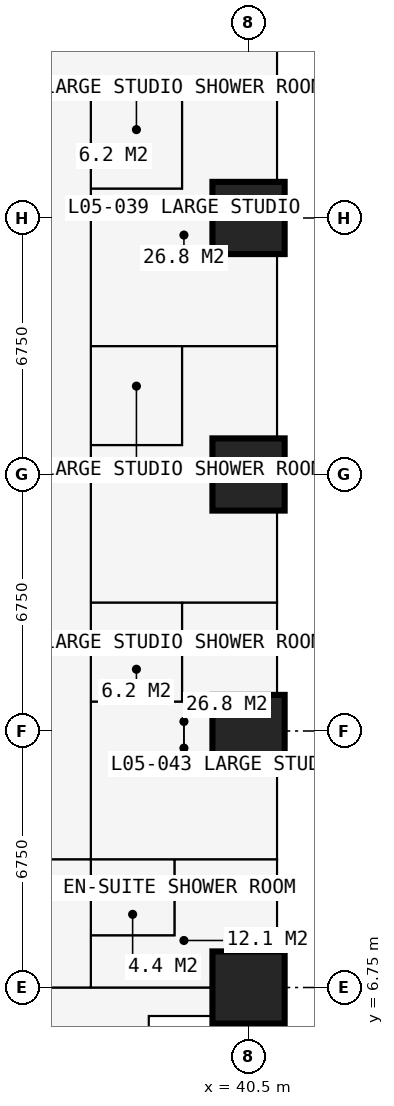
"""IFC4 building model, lengths in metres.
Left out: names, types, materials, properties, quantities, classifications, styles, units other than length and angle.
Written with IfcOpenShell. Run it as: python <this file> out.ifc"""

import sys

from ifc_helpers import new_model, si_unit, direction, frame, frame_2d, origin, origin_2d, place, context, subcontext, project, spatial, rectangle, extrude, element, fill, save


model = new_model("IFC4")
c1 = context("Model", 3, precision=1e-05, world=origin(), true_north=direction((0.0, 1.0)))
c2 = subcontext(c1, "Body", "Model", "MODEL_VIEW")
j1 = project(units=[si_unit("LENGTHUNIT", "METRE"), si_unit("PLANEANGLEUNIT", "RADIAN")], contexts=[c1])
p1 = place(None, origin())
s1 = spatial("IfcSite", under=j1, at=p1, CompositionType="ELEMENT")
p2 = place(p1, origin())
s2 = spatial("IfcBuilding", under=s1, at=p2, CompositionType="ELEMENT")
p3 = place(p2, frame((0.0, 0.0, 21.6)))
s3 = spatial("IfcBuildingStorey", under=s2, at=p3, CompositionType="ELEMENT", Elevation=21.6)
for number, where, z_axis, x_axis in (
    (1, (40.5, 6.75, 0.0), (0.0, 0.0, 1.0), (1.0, 0.0, 0.0)),
    (2, (40.5, 13.5, 0.0), (0.0, 0.0, 1.0), (1.0, 0.0, 0.0)),
    (3, (40.5, 20.25, 0.0), (0.0, 0.0, 1.0), (1.0, 0.0, 0.0)),
    (4, (40.5, 27.0, 0.0), (0.0, 0.0, 1.0), (1.0, 0.0, 0.0)),
):
    element("IfcColumn", number, at=place(p3, frame(where, z_axis=z_axis, x_axis=x_axis)), inside=s3, PredefinedType="COLUMN", context=c2, shape_type="SweptSolid", body=[
        extrude(rectangle(XDim=1.9, YDim=1.9, at=origin_2d()), origin(), (0.0, 0.0, 1.0), 3.6),
    ])
p4 = place(p3, frame((41.25, 27.0, 0.0), z_axis=(0.0, 0.0, 1.0), x_axis=(0.0, -1.0, 0.0)))
e5 = element("IfcWall", 5, at=p4, inside=s3, PredefinedType="SOLIDWALL", context=c2, shape_type="SweptSolid", body=[
    extrude(rectangle(XDim=6.75, YDim=0.15, at=frame_2d((3.375, 0.0))), origin(), (0.0, 0.0, 1.0), 3.375),
])
p5 = place(p4, frame((0.996, 0.0, 0.0)))
e6 = element("IfcOpeningElement", 6, at=p5, cuts=e5, PredefinedType="OPENING", context=c2, shape_type="SweptSolid", body=[
    extrude(rectangle(XDim=1.0, YDim=2.2, at=frame_2d((0.5, 1.1))), frame((0.0, 0.085, 0.0), z_axis=(0.0, -1.0, 0.0), x_axis=(1.0, 0.0, 0.0)), (0.0, 0.0, 1.0), 0.17),
])
p6 = place(p4, frame((2.042, 0.0, 0.9)))
e7 = element("IfcOpeningElement", 7, at=p6, cuts=e5, PredefinedType="OPENING", context=c2, shape_type="SweptSolid", body=[
    extrude(rectangle(XDim=1.2, YDim=1.8, at=frame_2d((0.6, 0.9))), frame((0.0, 0.085, 0.0), z_axis=(0.0, -1.0, 0.0), x_axis=(1.0, 0.0, 0.0)), (0.0, 0.0, 1.0), 0.17),
])
p7 = place(p4, frame((4.754, 0.0, 0.0)))
e8 = element("IfcOpeningElement", 8, at=p7, cuts=e5, PredefinedType="OPENING", context=c2, shape_type="SweptSolid", body=[
    extrude(rectangle(XDim=1.0, YDim=2.2, at=frame_2d((0.5, 1.1))), frame((0.0, 0.085, 0.0), z_axis=(0.0, -1.0, 0.0), x_axis=(1.0, 0.0, 0.0)), (0.0, 0.0, 1.0), 0.17),
])
p8 = place(p4, frame((3.508, 0.0, 0.9)))
e9 = element("IfcOpeningElement", 9, at=p8, cuts=e5, PredefinedType="OPENING", context=c2, shape_type="SweptSolid", body=[
    extrude(rectangle(XDim=1.2, YDim=1.8, at=frame_2d((0.6, 0.9))), frame((0.0, 0.085, 0.0), z_axis=(0.0, -1.0, 0.0), x_axis=(1.0, 0.0, 0.0)), (0.0, 0.0, 1.0), 0.17),
])
p9 = place(p3, frame((37.875, 2.625, 0.0), z_axis=(0.0, 0.0, 1.0), x_axis=(0.0, 1.0, 0.0)))
e10 = element("IfcWall", 10, at=p9, inside=s3, PredefinedType="SOLIDWALL", context=c2, shape_type="SweptSolid", body=[
    extrude(rectangle(XDim=3.375, YDim=0.3, at=frame_2d((1.688, 0.0))), origin(), (0.0, 0.0, 1.0), 3.375),
])
p10 = place(p9, frame((0.788, 0.0, 0.6)))
e11 = element("IfcOpeningElement", 11, at=p10, cuts=e10, PredefinedType="OPENING", context=c2, shape_type="SweptSolid", body=[
    extrude(rectangle(XDim=1.8, YDim=2.1, at=frame_2d((0.9, 1.05))), frame((0.0, 0.16, 0.0), z_axis=(0.0, -1.0, 0.0), x_axis=(1.0, 0.0, 0.0)), (0.0, 0.0, 1.0), 0.32),
])
p11 = place(p3, frame((37.875, 6.0, 0.0), z_axis=(0.0, 0.0, 1.0), x_axis=(1.0, 0.0, 0.0)))
e12 = element("IfcWall", 12, at=p11, inside=s3, PredefinedType="SOLIDWALL", context=c2, shape_type="SweptSolid", body=[
    extrude(rectangle(XDim=3.375, YDim=0.3, at=frame_2d((1.688, 0.0))), origin(), (0.0, 0.0, 1.0), 3.375),
])
p12 = place(p11, frame((0.317, 0.0, 0.9)))
e13 = element("IfcOpeningElement", 13, at=p12, cuts=e12, PredefinedType="OPENING", context=c2, shape_type="SweptSolid", body=[
    extrude(rectangle(XDim=1.2, YDim=1.8, at=frame_2d((0.6, 0.9))), frame((0.0, 0.16, 0.0), z_axis=(0.0, -1.0, 0.0), x_axis=(1.0, 0.0, 0.0)), (0.0, 0.0, 1.0), 0.32),
])
p13 = place(p3, frame((41.35, 23.625, 0.0), z_axis=(0.0, 0.0, 1.0), x_axis=(1.0, 0.0, 0.0)))
e14 = element("IfcWall", 14, at=p13, inside=s3, PredefinedType="USERDEFINED", context=c2, shape_type="SweptSolid", body=[
    extrude(rectangle(XDim=2.2, YDim=1.0, at=frame_2d((1.1, 0.0))), origin(), (0.0, 0.0, 1.0), 0.9),
])
p14 = place(p3, frame((30.375, 6.75, 0.0), z_axis=(0.0, 0.0, 1.0), x_axis=(1.0, 0.0, 0.0)))
e15 = element("IfcWall", 15, at=p14, inside=s3, PredefinedType="PARTITIONING", context=c2, shape_type="SweptSolid", body=[
    extrude(rectangle(XDim=10.859, YDim=0.15, at=frame_2d((5.429, 0.0))), origin(), (0.0, 0.0, 1.0), 2.877),
])
p15 = place(p14, frame((1.4, 0.0, 0.0)))
e16 = element("IfcOpeningElement", 16, at=p15, cuts=e15, PredefinedType="OPENING", context=c2, shape_type="SweptSolid", body=[
    extrude(rectangle(XDim=1.0, YDim=2.2, at=frame_2d((0.5, 1.1))), frame((0.0, 0.085, 0.0), z_axis=(0.0, -1.0, 0.0), x_axis=(1.0, 0.0, 0.0)), (0.0, 0.0, 1.0), 0.17),
])
p16 = place(p3, frame((30.375, 10.125, 0.0), z_axis=(0.0, 0.0, 1.0), x_axis=(1.0, 0.0, 0.0)))
e17 = element("IfcWall", 17, at=p16, inside=s3, PredefinedType="PARTITIONING", context=c2, shape_type="SweptSolid", body=[
    extrude(rectangle(XDim=10.859, YDim=0.15, at=frame_2d((5.429, 0.0))), origin(), (0.0, 0.0, 1.0), 3.375),
])
p17 = place(p16, frame((2.5, 0.0, 0.0)))
e18 = element("IfcOpeningElement", 18, at=p17, cuts=e17, PredefinedType="OPENING", context=c2, shape_type="SweptSolid", body=[
    extrude(rectangle(XDim=1.0, YDim=2.2, at=frame_2d((0.5, 1.1))), frame((0.0, 0.085, 0.0), z_axis=(0.0, -1.0, 0.0), x_axis=(1.0, 0.0, 0.0)), (0.0, 0.0, 1.0), 0.17),
])
p18 = place(p3, frame((30.375, 30.375, 0.0), z_axis=(0.0, 0.0, 1.0), x_axis=(1.0, 0.0, 0.0)))
e19 = element("IfcWall", 19, at=p18, inside=s3, PredefinedType="PARTITIONING", context=c2, shape_type="SweptSolid", body=[
    extrude(rectangle(XDim=10.859, YDim=0.15, at=frame_2d((5.429, 0.0))), origin(), (0.0, 0.0, 1.0), 3.375),
])
p19 = place(p3, frame((36.35, 6.75, 0.0), z_axis=(0.0, 0.0, 1.0), x_axis=(0.0, 1.0, 0.0)))
e20 = element("IfcWall", 20, at=p19, inside=s3, PredefinedType="PARTITIONING", context=c2, shape_type="SweptSolid", body=[
    extrude(rectangle(XDim=23.625, YDim=0.15, at=frame_2d((11.812, 0.0))), origin(), (0.0, 0.0, 1.0), 3.375),
])
p20 = place(p19, frame((0.2, 0.0, 0.0)))
e21 = element("IfcOpeningElement", 21, at=p20, cuts=e20, PredefinedType="OPENING", context=c2, shape_type="SweptSolid", body=[
    extrude(rectangle(XDim=0.95, YDim=2.2, at=frame_2d((0.475, 1.1))), frame((0.0, 0.085, 0.0), z_axis=(0.0, -1.0, 0.0), x_axis=(1.0, 0.0, 0.0)), (0.0, 0.0, 1.0), 0.17),
])
p21 = place(p19, frame((18.475, 0.0, 0.0)))
e22 = element("IfcOpeningElement", 22, at=p21, cuts=e20, PredefinedType="OPENING", context=c2, shape_type="SweptSolid", body=[
    extrude(rectangle(XDim=0.95, YDim=2.2, at=frame_2d((0.475, 1.1))), frame((0.0, 0.085, 0.0), z_axis=(0.0, -1.0, 0.0), x_axis=(1.0, 0.0, 0.0)), (0.0, 0.0, 1.0), 0.17),
])
p22 = place(p19, frame((11.725, 0.0, 0.0)))
e23 = element("IfcOpeningElement", 23, at=p22, cuts=e20, PredefinedType="OPENING", context=c2, shape_type="SweptSolid", body=[
    extrude(rectangle(XDim=0.95, YDim=2.2, at=frame_2d((0.475, 1.1))), frame((0.0, 0.085, 0.0), z_axis=(0.0, -1.0, 0.0), x_axis=(1.0, 0.0, 0.0)), (0.0, 0.0, 1.0), 0.17),
])
p23 = place(p19, frame((4.975, 0.0, 0.0)))
e24 = element("IfcOpeningElement", 24, at=p23, cuts=e20, PredefinedType="OPENING", context=c2, shape_type="SweptSolid", body=[
    extrude(rectangle(XDim=0.95, YDim=2.2, at=frame_2d((0.475, 1.1))), frame((0.0, 0.085, 0.0), z_axis=(0.0, -1.0, 0.0), x_axis=(1.0, 0.0, 0.0)), (0.0, 0.0, 1.0), 0.17),
])
p24 = place(p3, frame((36.35, 8.125, 0.0), z_axis=(0.0, 0.0, 1.0), x_axis=(1.0, 0.0, 0.0)))
e25 = element("IfcWall", 25, at=p24, inside=s3, PredefinedType="PARTITIONING", context=c2, shape_type="SweptSolid", body=[
    extrude(rectangle(XDim=2.2, YDim=0.1, at=frame_2d((1.1, 0.0))), origin(), (0.0, 0.0, 1.0), 3.375),
])
p25 = place(p24, frame((0.65, 0.0, 0.0)))
e26 = element("IfcOpeningElement", 26, at=p25, cuts=e25, PredefinedType="OPENING", context=c2, shape_type="SweptSolid", body=[
    extrude(rectangle(XDim=0.9, YDim=2.2, at=frame_2d((0.45, 1.1))), frame((0.0, 0.06, 0.0), z_axis=(0.0, -1.0, 0.0), x_axis=(1.0, 0.0, 0.0)), (0.0, 0.0, 1.0), 0.12),
])
p26 = place(p3, frame((36.35, 14.275, 0.0), z_axis=(0.0, 0.0, 1.0), x_axis=(1.0, 0.0, 0.0)))
e27 = element("IfcWall", 27, at=p26, inside=s3, PredefinedType="PARTITIONING", context=c2, shape_type="SweptSolid", body=[
    extrude(rectangle(XDim=2.4, YDim=0.1, at=frame_2d((1.2, 0.0))), origin(), (0.0, 0.0, 1.0), 3.375),
])
p27 = place(p3, frame((36.35, 16.875, 0.0), z_axis=(0.0, 0.0, 1.0), x_axis=(1.0, 0.0, 0.0)))
e28 = element("IfcWall", 28, at=p27, inside=s3, PredefinedType="PARTITIONING", context=c2, shape_type="SweptSolid", body=[
    extrude(rectangle(XDim=4.884, YDim=0.175, at=frame_2d((2.442, 0.0))), origin(), (0.0, 0.0, 1.0), 3.375),
])
p28 = place(p27, frame((0.75, 0.0, 0.0)))
e29 = element("IfcOpeningElement", 29, at=p28, cuts=e28, PredefinedType="OPENING", context=c2, shape_type="SweptSolid", body=[
    extrude(rectangle(XDim=0.9, YDim=2.2, at=frame_2d((0.45, 1.1))), frame((0.0, 0.097, 0.0), z_axis=(0.0, -1.0, 0.0), x_axis=(1.0, 0.0, 0.0)), (0.0, 0.0, 1.0), 0.195),
])
p29 = place(p3, frame((36.35, 21.025, 0.0), z_axis=(0.0, 0.0, 1.0), x_axis=(1.0, 0.0, 0.0)))
e30 = element("IfcWall", 30, at=p29, inside=s3, PredefinedType="PARTITIONING", context=c2, shape_type="SweptSolid", body=[
    extrude(rectangle(XDim=2.4, YDim=0.1, at=frame_2d((1.2, 0.0))), origin(), (0.0, 0.0, 1.0), 3.375),
])
p30 = place(p3, frame((36.35, 23.625, 0.0), z_axis=(0.0, 0.0, 1.0), x_axis=(1.0, 0.0, 0.0)))
e31 = element("IfcWall", 31, at=p30, inside=s3, PredefinedType="PARTITIONING", context=c2, shape_type="SweptSolid", body=[
    extrude(rectangle(XDim=4.884, YDim=0.175, at=frame_2d((2.442, 0.0))), origin(), (0.0, 0.0, 1.0), 3.375),
])
p31 = place(p30, frame((0.75, 0.0, 0.0)))
e32 = element("IfcOpeningElement", 32, at=p31, cuts=e31, PredefinedType="OPENING", context=c2, shape_type="SweptSolid", body=[
    extrude(rectangle(XDim=0.9, YDim=2.2, at=frame_2d((0.45, 1.1))), frame((0.0, 0.097, 0.0), z_axis=(0.0, -1.0, 0.0), x_axis=(1.0, 0.0, 0.0)), (0.0, 0.0, 1.0), 0.195),
])
p32 = place(p3, frame((36.35, 27.775, 0.0), z_axis=(0.0, 0.0, 1.0), x_axis=(1.0, 0.0, 0.0)))
e33 = element("IfcWall", 33, at=p32, inside=s3, PredefinedType="PARTITIONING", context=c2, shape_type="SweptSolid", body=[
    extrude(rectangle(XDim=2.4, YDim=0.1, at=frame_2d((1.2, 0.0))), origin(), (0.0, 0.0, 1.0), 3.375),
])
p33 = place(p3, frame((38.55, 8.125, 0.0), z_axis=(0.0, 0.0, 1.0), x_axis=(0.0, 1.0, 0.0)))
e34 = element("IfcWall", 34, at=p33, inside=s3, PredefinedType="PARTITIONING", context=c2, shape_type="SweptSolid", body=[
    extrude(rectangle(XDim=2.0, YDim=0.1, at=frame_2d((1.0, 0.0))), origin(), (0.0, 0.0, 1.0), 3.375),
])
for number, where, z_axis, x_axis in (
    (35, (38.75, 14.275, 0.0), (0.0, 0.0, 1.0), (0.0, 1.0, 0.0)),
    (36, (38.75, 21.025, 0.0), (0.0, 0.0, 1.0), (0.0, 1.0, 0.0)),
):
    element("IfcWall", number, at=place(p3, frame(where, z_axis=z_axis, x_axis=x_axis)), inside=s3, PredefinedType="PARTITIONING", context=c2, shape_type="SweptSolid", body=[
        extrude(rectangle(XDim=2.6, YDim=0.1, at=frame_2d((1.3, 0.0))), origin(), (0.0, 0.0, 1.0), 3.375),
    ])
p34 = place(p3, frame((38.75, 27.775, 0.0), z_axis=(0.0, 0.0, 1.0), x_axis=(0.0, 1.0, 0.0)))
e37 = element("IfcWall", 37, at=p34, inside=s3, PredefinedType="PARTITIONING", context=c2, shape_type="SweptSolid", body=[
    extrude(rectangle(XDim=2.6, YDim=0.1, at=frame_2d((1.3, 0.0))), origin(), (0.0, 0.0, 1.0), 3.375),
])
p35 = place(p34, frame((0.85, 0.0, 0.0)))
e38 = element("IfcOpeningElement", 38, at=p35, cuts=e37, PredefinedType="OPENING", context=c2, shape_type="SweptSolid", body=[
    extrude(rectangle(XDim=0.9, YDim=2.2, at=frame_2d((0.45, 1.1))), frame((0.0, 0.06, 0.0), z_axis=(0.0, -1.0, 0.0), x_axis=(1.0, 0.0, 0.0)), (0.0, 0.0, 1.0), 0.12),
])
p36 = place(p5, origin())
e39 = element("IfcDoor", 39, at=p36, inside=s3, OperationType="SINGLE_SWING_LEFT", PredefinedType="DOOR", context=c2, shape_type="SweptSolid", body=[
    extrude(rectangle(XDim=1.0, YDim=2.2, at=frame_2d((0.5, 1.1))), frame((0.0, 0.025, 0.0), z_axis=(0.0, -1.0, 0.0), x_axis=(1.0, 0.0, 0.0)), (0.0, 0.0, 1.0), 0.05),
])
fill(e6, e39)
p37 = place(p6, origin())
e40 = element("IfcWindow", 40, at=p37, inside=s3, PartitioningType="SINGLE_PANEL", PredefinedType="WINDOW", context=c2, shape_type="SweptSolid", body=[
    extrude(rectangle(XDim=1.2, YDim=1.8, at=frame_2d((0.6, 0.9))), frame((0.0, 0.03, 0.0), z_axis=(0.0, -1.0, 0.0), x_axis=(1.0, 0.0, 0.0)), (0.0, 0.0, 1.0), 0.06),
])
fill(e7, e40)
p38 = place(p7, origin())
e41 = element("IfcDoor", 41, at=p38, inside=s3, OperationType="SINGLE_SWING_RIGHT", PredefinedType="DOOR", context=c2, shape_type="SweptSolid", body=[
    extrude(rectangle(XDim=1.0, YDim=2.2, at=frame_2d((0.5, 1.1))), frame((0.0, 0.025, 0.0), z_axis=(0.0, -1.0, 0.0), x_axis=(1.0, 0.0, 0.0)), (0.0, 0.0, 1.0), 0.05),
])
fill(e8, e41)
p39 = place(p8, origin())
e42 = element("IfcWindow", 42, at=p39, inside=s3, PartitioningType="SINGLE_PANEL", PredefinedType="WINDOW", context=c2, shape_type="SweptSolid", body=[
    extrude(rectangle(XDim=1.2, YDim=1.8, at=frame_2d((0.6, 0.9))), frame((0.0, 0.03, 0.0), z_axis=(0.0, -1.0, 0.0), x_axis=(1.0, 0.0, 0.0)), (0.0, 0.0, 1.0), 0.06),
])
fill(e9, e42)
p40 = place(p12, origin())
e43 = element("IfcWindow", 43, at=p40, inside=s3, PartitioningType="SINGLE_PANEL", PredefinedType="WINDOW", context=c2, shape_type="SweptSolid", body=[
    extrude(rectangle(XDim=1.2, YDim=1.8, at=frame_2d((0.6, 0.9))), frame((0.0, 0.03, 0.0), z_axis=(0.0, -1.0, 0.0), x_axis=(1.0, 0.0, 0.0)), (0.0, 0.0, 1.0), 0.06),
])
fill(e13, e43)
p41 = place(p20, origin())
e44 = element("IfcDoor", 44, at=p41, inside=s3, OperationType="SINGLE_SWING_LEFT", PredefinedType="DOOR", context=c2, shape_type="SweptSolid", body=[
    extrude(rectangle(XDim=0.95, YDim=2.2, at=frame_2d((0.475, 1.1))), frame((0.0, 0.025, 0.0), z_axis=(0.0, -1.0, 0.0), x_axis=(1.0, 0.0, 0.0)), (0.0, 0.0, 1.0), 0.05),
])
fill(e21, e44)
p42 = place(p25, origin())
e45 = element("IfcDoor", 45, at=p42, inside=s3, OperationType="SINGLE_SWING_RIGHT", PredefinedType="DOOR", context=c2, shape_type="SweptSolid", body=[
    extrude(rectangle(XDim=0.9, YDim=2.2, at=frame_2d((0.45, 1.1))), frame((0.0, 0.025, 0.0), z_axis=(0.0, -1.0, 0.0), x_axis=(1.0, 0.0, 0.0)), (0.0, 0.0, 1.0), 0.05),
])
fill(e26, e45)
p43 = place(p21, origin())
e46 = element("IfcDoor", 46, at=p43, inside=s3, OperationType="SINGLE_SWING_LEFT", PredefinedType="DOOR", context=c2, shape_type="SweptSolid", body=[
    extrude(rectangle(XDim=0.95, YDim=2.2, at=frame_2d((0.475, 1.1))), frame((0.0, 0.025, 0.0), z_axis=(0.0, -1.0, 0.0), x_axis=(1.0, 0.0, 0.0)), (0.0, 0.0, 1.0), 0.05),
])
fill(e22, e46)
p44 = place(p35, origin())
e47 = element("IfcDoor", 47, at=p44, inside=s3, OperationType="SINGLE_SWING_RIGHT", PredefinedType="DOOR", context=c2, shape_type="SweptSolid", body=[
    extrude(rectangle(XDim=0.9, YDim=2.2, at=frame_2d((0.45, 1.1))), frame((0.0, 0.025, 0.0), z_axis=(0.0, -1.0, 0.0), x_axis=(1.0, 0.0, 0.0)), (0.0, 0.0, 1.0), 0.05),
])
fill(e38, e47)
p45 = place(p22, origin())
e48 = element("IfcDoor", 48, at=p45, inside=s3, OperationType="SINGLE_SWING_LEFT", PredefinedType="DOOR", context=c2, shape_type="SweptSolid", body=[
    extrude(rectangle(XDim=0.95, YDim=2.2, at=frame_2d((0.475, 1.1))), frame((0.0, 0.025, 0.0), z_axis=(0.0, -1.0, 0.0), x_axis=(1.0, 0.0, 0.0)), (0.0, 0.0, 1.0), 0.05),
])
fill(e23, e48)
p46 = place(p31, origin())
e49 = element("IfcDoor", 49, at=p46, inside=s3, OperationType="SINGLE_SWING_RIGHT", PredefinedType="DOOR", context=c2, shape_type="SweptSolid", body=[
    extrude(rectangle(XDim=0.9, YDim=2.2, at=frame_2d((0.45, 1.1))), frame((0.0, 0.025, 0.0), z_axis=(0.0, -1.0, 0.0), x_axis=(1.0, 0.0, 0.0)), (0.0, 0.0, 1.0), 0.05),
])
fill(e32, e49)
p47 = place(p23, origin())
e50 = element("IfcDoor", 50, at=p47, inside=s3, OperationType="SINGLE_SWING_LEFT", PredefinedType="DOOR", context=c2, shape_type="SweptSolid", body=[
    extrude(rectangle(XDim=0.95, YDim=2.2, at=frame_2d((0.475, 1.1))), frame((0.0, 0.025, 0.0), z_axis=(0.0, -1.0, 0.0), x_axis=(1.0, 0.0, 0.0)), (0.0, 0.0, 1.0), 0.05),
])
fill(e24, e50)
p48 = place(p28, origin())
e51 = element("IfcDoor", 51, at=p48, inside=s3, OperationType="SINGLE_SWING_RIGHT", PredefinedType="DOOR", context=c2, shape_type="SweptSolid", body=[
    extrude(rectangle(XDim=0.9, YDim=2.2, at=frame_2d((0.45, 1.1))), frame((0.0, 0.025, 0.0), z_axis=(0.0, -1.0, 0.0), x_axis=(1.0, 0.0, 0.0)), (0.0, 0.0, 1.0), 0.05),
])
fill(e29, e51)
save(model, sys.argv[1])
